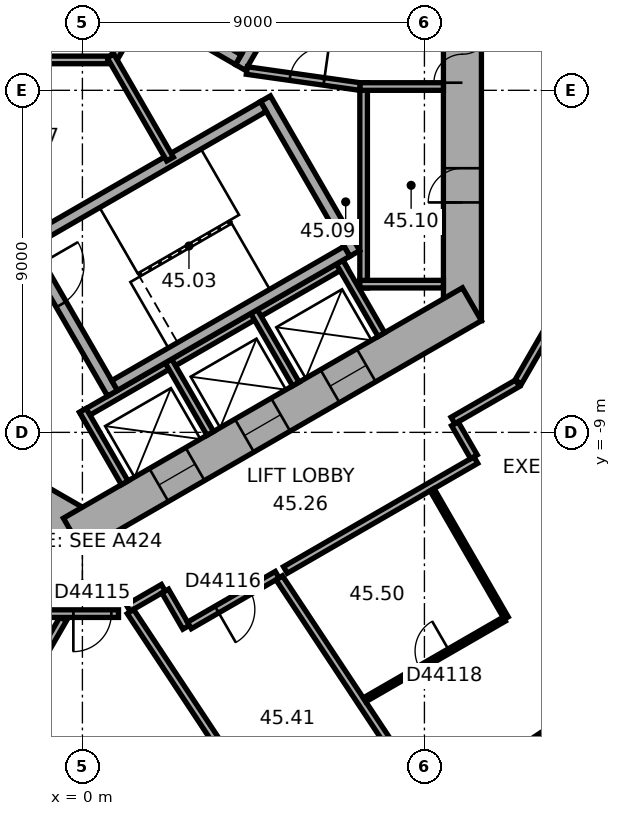
"""IFC4 building model, lengths in metres.
Left out: names, types, materials, properties, quantities, classifications, styles, units other than length and angle.
Written with IfcOpenShell. Run it as: python <this file> out.ifc"""

import sys

from ifc_helpers import new_model, si_unit, direction, frame, frame_2d, origin, origin_2d, place, context, subcontext, project, spatial, rectangle, extrude, element, fill, save


model = new_model("IFC4")
c1 = context("Model", 3, precision=1e-05, world=origin(), true_north=direction((0.0, 1.0)))
c2 = subcontext(c1, "Body", "Model", "MODEL_VIEW")
j1 = project(units=[si_unit("LENGTHUNIT", "METRE"), si_unit("PLANEANGLEUNIT", "RADIAN")], contexts=[c1])
p1 = place(None, origin())
s1 = spatial("IfcSite", under=j1, at=p1, CompositionType="ELEMENT")
p2 = place(p1, origin())
s2 = spatial("IfcBuilding", under=s1, at=p2, CompositionType="ELEMENT")
p3 = place(p2, frame((0.0, 0.0, 183.6)))
s3 = spatial("IfcBuildingStorey", under=s2, at=p3, CompositionType="ELEMENT", Elevation=183.6)
p4 = place(p3, frame((12.529, -17.13, 0.0), z_axis=(0.0, 0.0, 1.0), x_axis=(0.833885822067, 0.551936985312, 0.0)))
e1 = element("IfcColumn", 1, at=p4, inside=s3, PredefinedType="COLUMN", context=c2, shape_type="SweptSolid", body=[
    extrude(rectangle(XDim=0.9, YDim=0.9, at=origin_2d()), origin(), (0.0, 0.0, 1.0), 3.7),
])
p5 = place(p3, frame((10.0, -6.062, 0.0), z_axis=(0.0, 0.0, 1.0), x_axis=(0.0, 1.0, 0.0)))
e2 = element("IfcWall", 2, at=p5, inside=s3, PredefinedType="SHEAR", context=c2, shape_type="SweptSolid", body=[
    extrude(rectangle(XDim=12.125, YDim=1.0, at=frame_2d((6.062, 0.0))), origin(), (0.0, 0.0, 1.0), 3.7),
])
p6 = place(p5, frame((6.262, 0.0, 0.0)))
e3 = element("IfcOpeningElement", 3, at=p6, cuts=e2, PredefinedType="OPENING", context=c2, shape_type="SweptSolid", body=[
    extrude(rectangle(XDim=1.5, YDim=2.1, at=frame_2d((0.75, 1.05))), frame((0.0, 0.51, 0.0), z_axis=(0.0, -1.0, 0.0), x_axis=(1.0, 0.0, 0.0)), (0.0, 0.0, 1.0), 1.02),
])
p7 = place(p5, frame((3.112, 0.0, 0.0)))
e4 = element("IfcOpeningElement", 4, at=p7, cuts=e2, PredefinedType="OPENING", context=c2, shape_type="SweptSolid", body=[
    extrude(rectangle(XDim=0.9, YDim=2.1, at=frame_2d((0.45, 1.05))), frame((0.0, 0.51, 0.0), z_axis=(0.0, -1.0, 0.0), x_axis=(1.0, 0.0, 0.0)), (0.0, 0.0, 1.0), 1.02),
])
p8 = place(p3, frame((-10.25, -5.629, 0.0), z_axis=(0.0, 0.0, 1.0), x_axis=(0.866022616891, -0.50000482701, 0.0)))
e5 = element("IfcWall", 5, at=p8, inside=s3, PredefinedType="SHEAR", context=c2, shape_type="SweptSolid", body=[
    extrude(rectangle(XDim=12.125, YDim=1.0, at=frame_2d((6.062, 0.0))), origin(), (0.0, 0.0, 1.0), 3.7),
])
p9 = place(p8, frame((6.262, 0.0, 0.0)))
e6 = element("IfcOpeningElement", 6, at=p9, cuts=e5, PredefinedType="OPENING", context=c2, shape_type="SweptSolid", body=[
    extrude(rectangle(XDim=1.5, YDim=2.1, at=frame_2d((0.75, 1.05))), frame((0.0, 0.51, 0.0), z_axis=(0.0, -1.0, 0.0), x_axis=(1.0, 0.0, 0.0)), (0.0, 0.0, 1.0), 1.02),
])
p10 = place(p8, frame((1.712, 0.0, 0.0)))
e7 = element("IfcOpeningElement", 7, at=p10, cuts=e5, PredefinedType="OPENING", context=c2, shape_type="SweptSolid", body=[
    extrude(rectangle(XDim=1.1, YDim=2.1, at=frame_2d((0.55, 1.05))), frame((0.0, 0.51, 0.0), z_axis=(0.0, -1.0, 0.0), x_axis=(1.0, 0.0, 0.0)), (0.0, 0.0, 1.0), 1.02),
])
p11 = place(p8, frame((4.312, 0.0, 0.0)))
e8 = element("IfcOpeningElement", 8, at=p11, cuts=e5, PredefinedType="OPENING", context=c2, shape_type="SweptSolid", body=[
    extrude(rectangle(XDim=1.1, YDim=2.1, at=frame_2d((0.55, 1.05))), frame((0.0, 0.51, 0.0), z_axis=(0.0, -1.0, 0.0), x_axis=(1.0, 0.0, 0.0)), (0.0, 0.0, 1.0), 1.02),
])
p12 = place(p3, frame((-0.25, -11.691, 0.0), z_axis=(0.0, 0.0, 1.0), x_axis=(0.866022616891, 0.50000482701, 0.0)))
e9 = element("IfcWall", 9, at=p12, inside=s3, PredefinedType="SHEAR", context=c2, shape_type="SweptSolid", body=[
    extrude(rectangle(XDim=12.125, YDim=1.0, at=frame_2d((6.062, 0.0))), origin(), (0.0, 0.0, 1.0), 3.7),
])
p13 = place(p12, frame((2.612, 0.0, 0.0)))
e10 = element("IfcOpeningElement", 10, at=p13, cuts=e9, PredefinedType="OPENING", context=c2, shape_type="SweptSolid", body=[
    extrude(rectangle(XDim=1.1, YDim=2.1, at=frame_2d((0.55, 1.05))), frame((0.0, 0.51, 0.0), z_axis=(0.0, -1.0, 0.0), x_axis=(1.0, 0.0, 0.0)), (0.0, 0.0, 1.0), 1.02),
])
p14 = place(p12, frame((5.212, 0.0, 0.0)))
e11 = element("IfcOpeningElement", 11, at=p14, cuts=e9, PredefinedType="OPENING", context=c2, shape_type="SweptSolid", body=[
    extrude(rectangle(XDim=1.1, YDim=2.1, at=frame_2d((0.55, 1.05))), frame((0.0, 0.51, 0.0), z_axis=(0.0, -1.0, 0.0), x_axis=(1.0, 0.0, 0.0)), (0.0, 0.0, 1.0), 1.02),
])
p15 = place(p12, frame((7.812, 0.0, 0.0)))
e12 = element("IfcOpeningElement", 12, at=p15, cuts=e9, PredefinedType="OPENING", context=c2, shape_type="SweptSolid", body=[
    extrude(rectangle(XDim=1.1, YDim=2.1, at=frame_2d((0.55, 1.05))), frame((0.0, 0.51, 0.0), z_axis=(0.0, -1.0, 0.0), x_axis=(1.0, 0.0, 0.0)), (0.0, 0.0, 1.0), 1.02),
])
p16 = place(p3, frame((2.911, -24.156, 0.0), z_axis=(0.0, 0.0, 1.0), x_axis=(0.833882163564, 0.551942512668, 0.0)))
e13 = element("IfcWall", 13, at=p16, inside=s3, PredefinedType="STANDARD", context=c2, shape_type="SweptSolid", body=[
    extrude(rectangle(XDim=20.044, YDim=0.2, at=frame_2d((10.022, 0.0))), origin(), (0.0, 0.0, 1.0), 3.7),
])
p17 = place(p16, frame((1.313, 0.0, 0.9)))
e14 = element("IfcOpeningElement", 14, at=p17, cuts=e13, PredefinedType="OPENING", context=c2, shape_type="SweptSolid", body=[
    extrude(rectangle(XDim=2.4, YDim=2.0, at=frame_2d((1.2, 1.0))), frame((0.0, 0.11, 0.0), z_axis=(0.0, -1.0, 0.0), x_axis=(1.0, 0.0, 0.0)), (0.0, 0.0, 1.0), 0.22),
])
p18 = place(p16, frame((5.067, 0.0, 0.9)))
e15 = element("IfcOpeningElement", 15, at=p18, cuts=e13, PredefinedType="OPENING", context=c2, shape_type="SweptSolid", body=[
    extrude(rectangle(XDim=2.4, YDim=2.0, at=frame_2d((1.2, 1.0))), frame((0.0, 0.11, 0.0), z_axis=(0.0, -1.0, 0.0), x_axis=(1.0, 0.0, 0.0)), (0.0, 0.0, 1.0), 0.22),
])
p19 = place(p16, frame((8.821, 0.0, 0.9)))
e16 = element("IfcOpeningElement", 16, at=p19, cuts=e13, PredefinedType="OPENING", context=c2, shape_type="SweptSolid", body=[
    extrude(rectangle(XDim=2.4, YDim=2.0, at=frame_2d((1.2, 1.0))), frame((0.0, 0.11, 0.0), z_axis=(0.0, -1.0, 0.0), x_axis=(1.0, 0.0, 0.0)), (0.0, 0.0, 1.0), 0.22),
])
p20 = place(p16, frame((12.575, 0.0, 0.9)))
e17 = element("IfcOpeningElement", 17, at=p20, cuts=e13, PredefinedType="OPENING", context=c2, shape_type="SweptSolid", body=[
    extrude(rectangle(XDim=2.4, YDim=2.0, at=frame_2d((1.2, 1.0))), frame((0.0, 0.11, 0.0), z_axis=(0.0, -1.0, 0.0), x_axis=(1.0, 0.0, 0.0)), (0.0, 0.0, 1.0), 0.22),
])
p21 = place(p16, frame((16.329, 0.0, 0.9)))
e18 = element("IfcOpeningElement", 18, at=p21, cuts=e13, PredefinedType="OPENING", context=c2, shape_type="SweptSolid", body=[
    extrude(rectangle(XDim=2.4, YDim=2.0, at=frame_2d((1.2, 1.0))), frame((0.0, 0.11, 0.0), z_axis=(0.0, -1.0, 0.0), x_axis=(1.0, 0.0, 0.0)), (0.0, 0.0, 1.0), 0.22),
])
p22 = place(p3, frame((7.4, -5.2, 0.0), z_axis=(0.0, 0.0, 1.0), x_axis=(0.0, 1.0, 0.0)))
e19 = element("IfcWall", 19, at=p22, inside=s3, PredefinedType="PARTITIONING", context=c2, shape_type="SweptSolid", body=[
    extrude(rectangle(XDim=5.4, YDim=0.2, at=frame_2d((2.7, 0.0))), origin(), (0.0, 0.0, 1.0), 3.42),
])
for number, where, z_axis, x_axis in (
    (20, (7.3, -5.1, 0.0), (0.0, 0.0, 1.0), (1.0, 0.0, 0.0)),
    (21, (7.3, 0.1, 0.0), (0.0, 0.0, 1.0), (1.0, 0.0, 0.0)),
):
    element("IfcWall", number, at=place(p3, frame(where, z_axis=z_axis, x_axis=x_axis)), inside=s3, PredefinedType="PARTITIONING", context=c2, shape_type="SweptSolid", body=[
        extrude(rectangle(XDim=2.2, YDim=0.2, at=frame_2d((1.1, 0.0))), origin(), (0.0, 0.0, 1.0), 3.42),
    ])
p23 = place(p3, frame((-0.024, -8.559, 0.0), z_axis=(0.0, 0.0, 1.0), x_axis=(0.866026010844, 0.49999894854, 0.0)))
e22 = element("IfcWall", 22, at=p23, inside=s3, PredefinedType="PARTITIONING", context=c2, shape_type="SweptSolid", body=[
    extrude(rectangle(XDim=8.0, YDim=0.2, at=frame_2d((4.0, 0.0))), origin(), (0.0, 0.0, 1.0), 3.42),
])
for number, where, z_axis, x_axis in (
    (23, (0.013, -8.422, 0.0), (0.0, 0.0, 1.0), (0.5, -0.866, 0.0)),
    (24, (2.264, -7.122, 0.0), (0.0, 0.0, 1.0), (0.5, -0.866, 0.0)),
    (25, (4.516, -5.822, 0.0), (0.0, 0.0, 1.0), (0.5, -0.866, 0.0)),
    (26, (6.768, -4.522, 0.0), (0.0, 0.0, 1.0), (0.5, -0.866, 0.0)),
):
    element("IfcWall", number, at=place(p3, frame(where, z_axis=z_axis, x_axis=x_axis)), inside=s3, PredefinedType="PARTITIONING", context=c2, shape_type="SweptSolid", body=[
        extrude(rectangle(XDim=2.2, YDim=0.2, at=frame_2d((1.1, 0.0))), origin(), (0.0, 0.0, 1.0), 3.42),
    ])
p24 = place(p3, frame((4.158, 0.602, 0.0), z_axis=(0.0, 0.0, 1.0), x_axis=(0.499977259774, 0.866038532462, 0.0)))
e27 = element("IfcWall", 27, at=p24, inside=s3, PredefinedType="SHEAR", context=c2, shape_type="SweptSolid", body=[
    extrude(rectangle(XDim=4.7, YDim=0.3, at=frame_2d((2.35, 0.0))), origin(), (0.0, 0.0, 1.0), 3.42),
])
p25 = place(p24, frame((0.8, 0.0, 0.0)))
e28 = element("IfcOpeningElement", 28, at=p25, cuts=e27, PredefinedType="OPENING", context=c2, shape_type="SweptSolid", body=[
    extrude(rectangle(XDim=1.2, YDim=2.1, at=frame_2d((0.6, 1.05))), frame((0.0, 0.16, 0.0), z_axis=(0.0, -1.0, 0.0), x_axis=(1.0, 0.0, 0.0)), (0.0, 0.0, 1.0), 0.32),
])
p26 = place(p3, frame((4.103, 0.807, 0.0), z_axis=(0.0, 0.0, 1.0), x_axis=(-0.866027801685, 0.499995846692, 0.0)))
e29 = element("IfcWall", 29, at=p26, inside=s3, PredefinedType="SHEAR", context=c2, shape_type="SweptSolid", body=[
    extrude(rectangle(XDim=7.06, YDim=0.3, at=frame_2d((3.53, 0.0))), origin(), (0.0, 0.0, 1.0), 3.42),
])
p27 = place(p3, frame((-1.558, -3.902, 0.0), z_axis=(0.0, 0.0, 1.0), x_axis=(0.499977259774, -0.866038532462, 0.0)))
e30 = element("IfcWall", 30, at=p27, inside=s3, PredefinedType="SHEAR", context=c2, shape_type="SweptSolid", body=[
    extrude(rectangle(XDim=4.7, YDim=0.3, at=frame_2d((2.35, 0.0))), origin(), (0.0, 0.0, 1.0), 3.42),
])
p28 = place(p27, frame((0.8, 0.0, 0.0)))
e31 = element("IfcOpeningElement", 31, at=p28, cuts=e30, PredefinedType="OPENING", context=c2, shape_type="SweptSolid", body=[
    extrude(rectangle(XDim=1.2, YDim=2.1, at=frame_2d((0.6, 1.05))), frame((0.0, 0.16, 0.0), z_axis=(0.0, -1.0, 0.0), x_axis=(1.0, 0.0, 0.0)), (0.0, 0.0, 1.0), 0.32),
])
p29 = place(p3, frame((4.816, -0.222, 0.0), z_axis=(0.0, 0.0, 1.0), x_axis=(0.499977259774, -0.866038532462, 0.0)))
e32 = element("IfcWall", 32, at=p29, inside=s3, PredefinedType="SHEAR", context=c2, shape_type="SweptSolid", body=[
    extrude(rectangle(XDim=4.7, YDim=0.3, at=frame_2d((2.35, 0.0))), origin(), (0.0, 0.0, 1.0), 3.42),
])
for number, where, z_axis, x_axis in (
    (33, (-1.353, -3.957, 0.0), (0.0, 0.0, 1.0), (0.866, 0.5, 0.0)),
    (34, (0.847, -7.767, 0.0), (0.0, 0.0, 1.0), (0.866, 0.5, 0.0)),
):
    element("IfcWall", number, at=place(p3, frame(where, z_axis=z_axis, x_axis=x_axis)), inside=s3, PredefinedType="SHEAR", context=c2, shape_type="SweptSolid", body=[
        extrude(rectangle(XDim=7.06, YDim=0.3, at=frame_2d((3.53, 0.0))), origin(), (0.0, 0.0, 1.0), 3.42),
    ])
p30 = place(p3, frame((4.327, 0.521, 0.0), z_axis=(0.0, 0.0, 1.0), x_axis=(0.990124376366, -0.14019172346, 0.0)))
e35 = element("IfcWall", 35, at=p30, inside=s3, PredefinedType="PARTITIONING", context=c2, shape_type="SweptSolid", body=[
    extrude(rectangle(XDim=3.002, YDim=0.2, at=frame_2d((1.501, 0.0))), origin(), (0.0, 0.0, 1.0), 3.42),
])
p31 = place(p30, frame((1.15, 0.0, 0.0)))
e36 = element("IfcOpeningElement", 36, at=p31, cuts=e35, PredefinedType="OPENING", context=c2, shape_type="SweptSolid", body=[
    extrude(rectangle(XDim=0.9, YDim=2.1, at=frame_2d((0.45, 1.05))), frame((0.0, 0.11, 0.0), z_axis=(0.0, -1.0, 0.0), x_axis=(1.0, 0.0, 0.0)), (0.0, 0.0, 1.0), 0.22),
])
p32 = place(p3, frame((0.92, 0.8, 0.0), z_axis=(0.0, 0.0, 1.0), x_axis=(-1.0, 0.0, 0.0)))
e37 = element("IfcWall", 37, at=p32, inside=s3, PredefinedType="PARTITIONING", context=c2, shape_type="SweptSolid", body=[
    extrude(rectangle(XDim=3.64, YDim=0.2, at=frame_2d((1.82, 0.0))), origin(), (0.0, 0.0, 1.0), 3.42),
])
p33 = place(p3, frame((0.74, 0.696, 0.0), z_axis=(0.0, 0.0, 1.0), x_axis=(0.499956301907, 0.86605063142, 0.0)))
e38 = element("IfcWall", 38, at=p33, inside=s3, PredefinedType="PARTITIONING", context=c2, shape_type="SweptSolid", body=[
    extrude(rectangle(XDim=1.747, YDim=0.2, at=frame_2d((0.874, 0.0))), origin(), (0.0, 0.0, 1.0), 3.42),
])
p34 = place(p3, frame((0.74, 0.904, 0.0), z_axis=(0.0, 0.0, 1.0), x_axis=(0.500028278809, -0.866009076391, 0.0)))
e39 = element("IfcWall", 39, at=p34, inside=s3, PredefinedType="PARTITIONING", context=c2, shape_type="SweptSolid", body=[
    extrude(rectangle(XDim=3.133, YDim=0.2, at=frame_2d((1.566, 0.0))), origin(), (0.0, 0.0, 1.0), 3.42),
])
p35 = place(p3, frame((-4.732, -21.228, 0.0), z_axis=(0.0, 0.0, 1.0), x_axis=(0.500000843414, 0.866024916838, 0.0)))
e40 = element("IfcWall", 40, at=p35, inside=s3, PredefinedType="PARTITIONING", context=c2, shape_type="SweptSolid", body=[
    extrude(rectangle(XDim=8.452, YDim=0.2, at=frame_2d((4.226, 0.0))), origin(), (0.0, 0.0, 1.0), 3.42),
])
p36 = place(p3, frame((-0.91, -13.77, 0.0), z_axis=(0.0, 0.0, 1.0), x_axis=(1.0, 0.0, 0.0)))
e41 = element("IfcWall", 41, at=p36, inside=s3, PredefinedType="PARTITIONING", context=c2, shape_type="SweptSolid", body=[
    extrude(rectangle(XDim=1.86, YDim=0.2, at=frame_2d((0.93, 0.0))), origin(), (0.0, 0.0, 1.0), 3.42),
])
p37 = place(p36, frame((0.672, 0.0, 0.0)))
e42 = element("IfcOpeningElement", 42, at=p37, cuts=e41, PredefinedType="OPENING", context=c2, shape_type="SweptSolid", body=[
    extrude(rectangle(XDim=1.0, YDim=2.1, at=frame_2d((0.5, 1.05))), frame((0.0, 0.11, 0.0), z_axis=(0.0, -1.0, 0.0), x_axis=(1.0, 0.0, 0.0)), (0.0, 0.0, 1.0), 0.22),
])
p38 = place(p3, frame((1.204, -13.623, 0.0), z_axis=(0.0, 0.0, 1.0), x_axis=(0.866040989419, 0.499973003918, 0.0)))
e43 = element("IfcWall", 43, at=p38, inside=s3, PredefinedType="PARTITIONING", context=c2, shape_type="SweptSolid", body=[
    extrude(rectangle(XDim=1.068, YDim=0.2, at=frame_2d((0.534, 0.0))), origin(), (0.0, 0.0, 1.0), 3.42),
])
p39 = place(p3, frame((2.179, -13.176, 0.0), z_axis=(0.0, 0.0, 1.0), x_axis=(0.499978356969, -0.866037899034, 0.0)))
e44 = element("IfcWall", 44, at=p39, inside=s3, PredefinedType="PARTITIONING", context=c2, shape_type="SweptSolid", body=[
    extrude(rectangle(XDim=1.101, YDim=0.2, at=frame_2d((0.551, 0.0))), origin(), (0.0, 0.0, 1.0), 3.42),
])
p40 = place(p3, frame((2.816, -14.079, 0.0), z_axis=(0.0, 0.0, 1.0), x_axis=(0.866008705299, 0.50002892151, 0.0)))
e45 = element("IfcWall", 45, at=p40, inside=s3, PredefinedType="PARTITIONING", context=c2, shape_type="SweptSolid", body=[
    extrude(rectangle(XDim=2.666, YDim=0.2, at=frame_2d((1.333, 0.0))), origin(), (0.0, 0.0, 1.0), 3.42),
])
p41 = place(p40, frame((0.833, 0.0, 0.0)))
e46 = element("IfcOpeningElement", 46, at=p41, cuts=e45, PredefinedType="OPENING", context=c2, shape_type="SweptSolid", body=[
    extrude(rectangle(XDim=1.0, YDim=2.1, at=frame_2d((0.5, 1.05))), frame((0.0, 0.11, 0.0), z_axis=(0.0, -1.0, 0.0), x_axis=(1.0, 0.0, 0.0)), (0.0, 0.0, 1.0), 0.22),
])
p42 = place(p3, frame((5.342, -12.621, 0.0), z_axis=(0.0, 0.0, 1.0), x_axis=(0.866024665123, 0.500001279396, 0.0)))
e47 = element("IfcWall", 47, at=p42, inside=s3, PredefinedType="PARTITIONING", context=c2, shape_type="SweptSolid", body=[
    extrude(rectangle(XDim=5.786, YDim=0.2, at=frame_2d((2.893, 0.0))), origin(), (0.0, 0.0, 1.0), 3.42),
])
p43 = place(p3, frame((6.02, -20.899, 0.0), z_axis=(0.0, 0.0, 1.0), x_axis=(-0.551943990108, 0.833881185651, 0.0)))
e48 = element("IfcWall", 48, at=p43, inside=s3, PredefinedType="PARTITIONING", context=c2, shape_type="SweptSolid", body=[
    extrude(rectangle(XDim=8.615, YDim=0.2, at=frame_2d((4.308, 0.0))), origin(), (0.0, 0.0, 1.0), 3.42),
])
p44 = place(p3, frame((9.15, -18.827, 0.0), z_axis=(0.0, 0.0, 1.0), x_axis=(-0.551939801345, 0.833883958169, 0.0)))
e49 = element("IfcWall", 49, at=p44, inside=s3, PredefinedType="PARTITIONING", context=c2, shape_type="SweptSolid", body=[
    extrude(rectangle(XDim=7.192, YDim=0.2, at=frame_2d((3.596, 0.0))), origin(), (0.0, 0.0, 1.0), 2.87),
])
p45 = place(p3, frame((9.202, -10.508, 0.0), z_axis=(0.0, 0.0, 1.0), x_axis=(0.500043961785, -0.866000020948, 0.0)))
e50 = element("IfcWall", 50, at=p45, inside=s3, PredefinedType="PARTITIONING", context=c2, shape_type="SweptSolid", body=[
    extrude(rectangle(XDim=3.9, YDim=0.12, at=frame_2d((1.95, 0.0))), origin(), (0.0, 0.0, 1.0), 3.42),
])
p46 = place(p3, frame((9.752, -8.688, 0.0), z_axis=(0.0, 0.0, 1.0), x_axis=(0.865974105138, 0.500088841337, 0.0)))
e51 = element("IfcWall", 51, at=p46, inside=s3, PredefinedType="PARTITIONING", context=c2, shape_type="SweptSolid", body=[
    extrude(rectangle(XDim=1.961, YDim=0.2, at=frame_2d((0.98, 0.0))), origin(), (0.0, 0.0, 1.0), 3.42),
])
p47 = place(p3, frame((10.302, -9.642, 0.0), z_axis=(0.0, 0.0, 1.0), x_axis=(-0.500074377092, 0.865982457891, 0.0)))
e52 = element("IfcWall", 52, at=p47, inside=s3, PredefinedType="PARTITIONING", context=c2, shape_type="SweptSolid", body=[
    extrude(rectangle(XDim=1.001, YDim=0.2, at=frame_2d((0.5, 0.0))), origin(), (0.0, 0.0, 1.0), 3.42),
])
p48 = place(p3, frame((11.1, -13.915, 0.0), z_axis=(0.0, 0.0, 1.0), x_axis=(-0.866048475386, -0.499960036685, 0.0)))
e53 = element("IfcWall", 53, at=p48, inside=s3, PredefinedType="PARTITIONING", context=c2, shape_type="SweptSolid", body=[
    extrude(rectangle(XDim=4.24, YDim=0.12, at=frame_2d((2.12, 0.0))), origin(), (0.0, 0.0, 1.0), 3.42),
])
p49 = place(p48, frame((1.67, 0.0, 0.0)))
e54 = element("IfcOpeningElement", 54, at=p49, cuts=e53, PredefinedType="OPENING", context=c2, shape_type="SweptSolid", body=[
    extrude(rectangle(XDim=0.9, YDim=2.1, at=frame_2d((0.45, 1.05))), frame((0.0, 0.07, 0.0), z_axis=(0.0, -1.0, 0.0), x_axis=(1.0, 0.0, 0.0)), (0.0, 0.0, 1.0), 0.14),
])
p50 = place(p3, frame((11.47, -7.673, 0.0), z_axis=(0.0, 0.0, 1.0), x_axis=(0.499964847546, 0.866045698112, 0.0)))
e55 = element("IfcWall", 55, at=p50, inside=s3, PredefinedType="PARTITIONING", context=c2, shape_type="SweptSolid", body=[
    extrude(rectangle(XDim=1.86, YDim=0.2, at=frame_2d((0.93, 0.0))), origin(), (0.0, 0.0, 1.0), 3.42),
])
p51 = place(p6, origin())
e56 = element("IfcDoor", 56, at=p51, inside=s3, OperationType="DOUBLE_DOOR_SINGLE_SWING", PredefinedType="DOOR", context=c2, shape_type="SweptSolid", body=[
    extrude(rectangle(XDim=1.5, YDim=2.1, at=frame_2d((0.75, 1.05))), frame((0.0, 0.025, 0.0), z_axis=(0.0, -1.0, 0.0), x_axis=(1.0, 0.0, 0.0)), (0.0, 0.0, 1.0), 0.05),
])
fill(e3, e56)
p52 = place(p28, origin())
e57 = element("IfcDoor", 57, at=p52, inside=s3, OperationType="SINGLE_SWING_RIGHT", PredefinedType="DOOR", context=c2, shape_type="SweptSolid", body=[
    extrude(rectangle(XDim=1.2, YDim=2.1, at=frame_2d((0.6, 1.05))), frame((0.0, 0.025, 0.0), z_axis=(0.0, -1.0, 0.0), x_axis=(1.0, 0.0, 0.0)), (0.0, 0.0, 1.0), 0.05),
])
fill(e31, e57)
p53 = place(p31, origin())
e58 = element("IfcDoor", 58, at=p53, inside=s3, OperationType="SINGLE_SWING_LEFT", PredefinedType="DOOR", context=c2, shape_type="SweptSolid", body=[
    extrude(rectangle(XDim=0.9, YDim=2.1, at=frame_2d((0.45, 1.05))), frame((0.0, 0.025, 0.0), z_axis=(0.0, -1.0, 0.0), x_axis=(1.0, 0.0, 0.0)), (0.0, 0.0, 1.0), 0.05),
])
fill(e36, e58)
p54 = place(p7, origin())
e59 = element("IfcDoor", 59, at=p54, inside=s3, OperationType="SINGLE_SWING_LEFT", PredefinedType="DOOR", context=c2, shape_type="SweptSolid", body=[
    extrude(rectangle(XDim=0.9, YDim=2.1, at=frame_2d((0.45, 1.05))), frame((0.0, 0.025, 0.0), z_axis=(0.0, -1.0, 0.0), x_axis=(1.0, 0.0, 0.0)), (0.0, 0.0, 1.0), 0.05),
])
fill(e4, e59)
p55 = place(p13, origin())
e60 = element("IfcDoor", 60, at=p55, inside=s3, OperationType="DOUBLE_DOOR_SLIDING", PredefinedType="DOOR", context=c2, shape_type="SweptSolid", body=[
    extrude(rectangle(XDim=1.1, YDim=2.1, at=frame_2d((0.55, 1.05))), frame((0.0, 0.025, 0.0), z_axis=(0.0, -1.0, 0.0), x_axis=(1.0, 0.0, 0.0)), (0.0, 0.0, 1.0), 0.05),
])
fill(e10, e60)
p56 = place(p14, origin())
e61 = element("IfcDoor", 61, at=p56, inside=s3, OperationType="DOUBLE_DOOR_SLIDING", PredefinedType="DOOR", context=c2, shape_type="SweptSolid", body=[
    extrude(rectangle(XDim=1.1, YDim=2.1, at=frame_2d((0.55, 1.05))), frame((0.0, 0.025, 0.0), z_axis=(0.0, -1.0, 0.0), x_axis=(1.0, 0.0, 0.0)), (0.0, 0.0, 1.0), 0.05),
])
fill(e11, e61)
p57 = place(p15, origin())
e62 = element("IfcDoor", 62, at=p57, inside=s3, OperationType="DOUBLE_DOOR_SLIDING", PredefinedType="DOOR", context=c2, shape_type="SweptSolid", body=[
    extrude(rectangle(XDim=1.1, YDim=2.1, at=frame_2d((0.55, 1.05))), frame((0.0, 0.025, 0.0), z_axis=(0.0, -1.0, 0.0), x_axis=(1.0, 0.0, 0.0)), (0.0, 0.0, 1.0), 0.05),
])
fill(e12, e62)
p58 = place(p37, origin())
e63 = element("IfcDoor", 63, at=p58, inside=s3, OperationType="SINGLE_SWING_LEFT", PredefinedType="DOOR", context=c2, shape_type="SweptSolid", body=[
    extrude(rectangle(XDim=1.0, YDim=2.1, at=frame_2d((0.5, 1.05))), frame((0.0, 0.025, 0.0), z_axis=(0.0, -1.0, 0.0), x_axis=(1.0, 0.0, 0.0)), (0.0, 0.0, 1.0), 0.05),
])
fill(e42, e63)
p59 = place(p41, origin())
e64 = element("IfcDoor", 64, at=p59, inside=s3, OperationType="SINGLE_SWING_LEFT", PredefinedType="DOOR", context=c2, shape_type="SweptSolid", body=[
    extrude(rectangle(XDim=1.0, YDim=2.1, at=frame_2d((0.5, 1.05))), frame((0.0, 0.025, 0.0), z_axis=(0.0, -1.0, 0.0), x_axis=(1.0, 0.0, 0.0)), (0.0, 0.0, 1.0), 0.05),
])
fill(e46, e64)
p60 = place(p49, origin())
e65 = element("IfcDoor", 65, at=p60, inside=s3, OperationType="SINGLE_SWING_LEFT", PredefinedType="DOOR", context=c2, shape_type="SweptSolid", body=[
    extrude(rectangle(XDim=0.9, YDim=2.1, at=frame_2d((0.45, 1.05))), frame((0.0, 0.025, 0.0), z_axis=(0.0, -1.0, 0.0), x_axis=(1.0, 0.0, 0.0)), (0.0, 0.0, 1.0), 0.05),
])
fill(e54, e65)
save(model, sys.argv[1])
